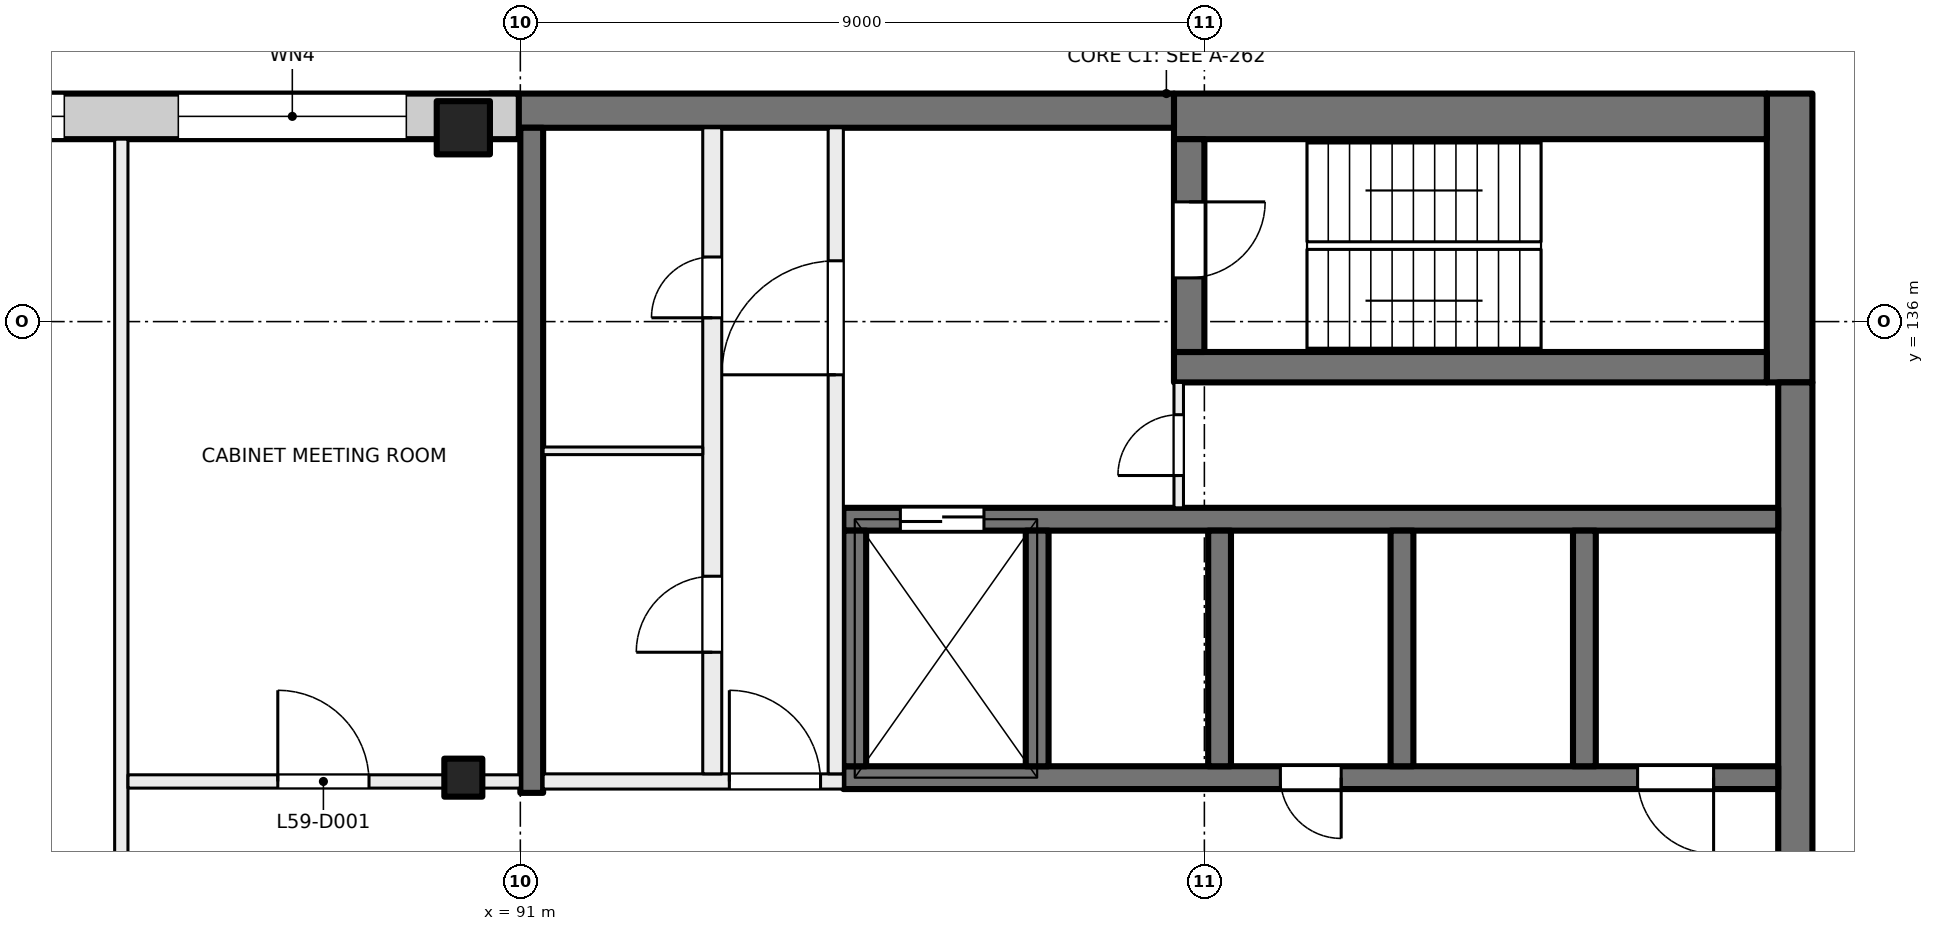
"""IFC4 building model, lengths in metres.
Left out: names, types, materials, properties, quantities, classifications, styles, units other than length and angle.
Written with IfcOpenShell. Run it as: python <this file> out.ifc"""

import sys

from ifc_helpers import new_model, si_unit, direction, frame, frame_2d, origin, origin_2d, place, context, subcontext, project, spatial, rectangle, extrude, element, fill, save


model = new_model("IFC4")
c1 = context("Model", 3, precision=1e-05, world=origin(), true_north=direction((0.0, 1.0)))
c2 = subcontext(c1, "Body", "Model", "MODEL_VIEW")
j1 = project(units=[si_unit("LENGTHUNIT", "METRE"), si_unit("PLANEANGLEUNIT", "RADIAN")], contexts=[c1])
p1 = place(None, origin())
s1 = spatial("IfcSite", under=j1, at=p1, CompositionType="ELEMENT")
p2 = place(p1, origin())
s2 = spatial("IfcBuilding", under=s1, at=p2, CompositionType="ELEMENT")
p3 = place(p2, frame((0.0, 0.0, 249.5)))
s3 = spatial("IfcBuildingStorey", under=s2, at=p3, CompositionType="ELEMENT", Elevation=249.5)
p4 = place(p3, frame((90.25, 130.0, 0.0), z_axis=(0.0, 0.0, 1.0), x_axis=(1.0, 0.0, 0.0)))
e1 = element("IfcColumn", 1, at=p4, inside=s3, PredefinedType="COLUMN", context=c2, shape_type="SweptSolid", body=[
    extrude(rectangle(XDim=0.5, YDim=0.5, at=origin_2d()), origin(), (0.0, 0.0, 1.0), 4.0),
])
p5 = place(p3, frame((90.25, 138.55, 0.0), z_axis=(0.0, 0.0, 1.0), x_axis=(1.0, 0.0, 0.0)))
e2 = element("IfcColumn", 2, at=p5, inside=s3, PredefinedType="COLUMN", context=c2, shape_type="SweptSolid", body=[
    extrude(rectangle(XDim=0.7, YDim=0.7, at=origin_2d()), origin(), (0.0, 0.0, 1.0), 4.0),
])
p6 = place(p3, frame((107.7, 139.0, 0.0), z_axis=(0.0, 0.0, 1.0), x_axis=(0.0, -1.0, 0.0)))
e3 = element("IfcWall", 3, at=p6, inside=s3, PredefinedType="SHEAR", context=c2, shape_type="SweptSolid", body=[
    extrude(rectangle(XDim=3.8, YDim=0.6, at=frame_2d((1.9, 0.0))), origin(), (0.0, 0.0, 1.0), 4.0),
])
p7 = place(p3, frame((107.775, 135.2, 0.0), z_axis=(0.0, 0.0, 1.0), x_axis=(0.0, -1.0, 0.0)))
e4 = element("IfcWall", 4, at=p7, inside=s3, PredefinedType="SHEAR", context=c2, shape_type="SweptSolid", body=[
    extrude(rectangle(XDim=14.4, YDim=0.45, at=frame_2d((7.2, 0.0))), origin(), (0.0, 0.0, 1.0), 4.0),
])
p8 = place(p3, frame((107.4, 138.7, 0.0), z_axis=(0.0, 0.0, 1.0), x_axis=(-1.0, 0.0, 0.0)))
e5 = element("IfcWall", 5, at=p8, inside=s3, PredefinedType="SHEAR", context=c2, shape_type="SweptSolid", body=[
    extrude(rectangle(XDim=7.8, YDim=0.6, at=frame_2d((3.9, 0.0))), origin(), (0.0, 0.0, 1.0), 4.0),
])
p9 = place(p3, frame((99.6, 138.775, 0.0), z_axis=(0.0, 0.0, 1.0), x_axis=(-1.0, 0.0, 0.0)))
e6 = element("IfcWall", 6, at=p9, inside=s3, PredefinedType="SHEAR", context=c2, shape_type="SweptSolid", body=[
    extrude(rectangle(XDim=9.0, YDim=0.45, at=frame_2d((4.5, 0.0))), origin(), (0.0, 0.0, 1.0), 4.0),
])
p10 = place(p3, frame((107.4, 135.4, 0.0), z_axis=(0.0, 0.0, 1.0), x_axis=(-1.0, 0.0, 0.0)))
e7 = element("IfcWall", 7, at=p10, inside=s3, PredefinedType="SHEAR", context=c2, shape_type="SweptSolid", body=[
    extrude(rectangle(XDim=7.8, YDim=0.4, at=frame_2d((3.9, 0.0))), origin(), (0.0, 0.0, 1.0), 4.0),
])
p11 = place(p3, frame((99.8, 138.4, 0.0), z_axis=(0.0, 0.0, 1.0), x_axis=(0.0, -1.0, 0.0)))
e8 = element("IfcWall", 8, at=p11, inside=s3, PredefinedType="SHEAR", context=c2, shape_type="SweptSolid", body=[
    extrude(rectangle(XDim=2.8, YDim=0.4, at=frame_2d((1.4, 0.0))), origin(), (0.0, 0.0, 1.0), 4.0),
])
p12 = place(p11, frame((0.825, 0.0, 0.0)))
e9 = element("IfcOpeningElement", 9, at=p12, cuts=e8, PredefinedType="OPENING", context=c2, shape_type="SweptSolid", body=[
    extrude(rectangle(XDim=1.0, YDim=2.1, at=frame_2d((0.5, 1.05))), frame((0.0, 0.21, 0.0), z_axis=(0.0, -1.0, 0.0), x_axis=(1.0, 0.0, 0.0)), (0.0, 0.0, 1.0), 0.42),
])
p13 = place(p3, frame((107.55, 130.0, 0.0), z_axis=(0.0, 0.0, 1.0), x_axis=(-1.0, 0.0, 0.0)))
e10 = element("IfcWall", 10, at=p13, inside=s3, PredefinedType="SHEAR", context=c2, shape_type="SweptSolid", body=[
    extrude(rectangle(XDim=12.3, YDim=0.3, at=frame_2d((6.15, 0.0))), origin(), (0.0, 0.0, 1.0), 4.0),
])
p14 = place(p13, frame((0.85, 0.0, 0.0)))
e11 = element("IfcOpeningElement", 11, at=p14, cuts=e10, PredefinedType="OPENING", context=c2, shape_type="SweptSolid", body=[
    extrude(rectangle(XDim=1.0, YDim=2.1, at=frame_2d((0.5, 1.05))), frame((0.0, 0.16, 0.0), z_axis=(0.0, -1.0, 0.0), x_axis=(1.0, 0.0, 0.0)), (0.0, 0.0, 1.0), 0.32),
])
p15 = place(p13, frame((5.75, 0.0, 0.0)))
e12 = element("IfcOpeningElement", 12, at=p15, cuts=e10, PredefinedType="OPENING", context=c2, shape_type="SweptSolid", body=[
    extrude(rectangle(XDim=0.8, YDim=2.1, at=frame_2d((0.4, 1.05))), frame((0.0, 0.16, 0.0), z_axis=(0.0, -1.0, 0.0), x_axis=(1.0, 0.0, 0.0)), (0.0, 0.0, 1.0), 0.32),
])
p16 = place(p3, frame((107.55, 133.4, 0.0), z_axis=(0.0, 0.0, 1.0), x_axis=(-1.0, 0.0, 0.0)))
e13 = element("IfcWall", 13, at=p16, inside=s3, PredefinedType="SHEAR", context=c2, shape_type="SweptSolid", body=[
    extrude(rectangle(XDim=12.3, YDim=0.3, at=frame_2d((6.15, 0.0))), origin(), (0.0, 0.0, 1.0), 4.0),
])
p17 = place(p16, frame((10.45, 0.0, 0.0)))
e14 = element("IfcOpeningElement", 14, at=p17, cuts=e13, PredefinedType="OPENING", context=c2, shape_type="SweptSolid", body=[
    extrude(rectangle(XDim=1.1, YDim=2.1, at=frame_2d((0.55, 1.05))), frame((0.0, 0.16, 0.0), z_axis=(0.0, -1.0, 0.0), x_axis=(1.0, 0.0, 0.0)), (0.0, 0.0, 1.0), 0.32),
])
for number, where, z_axis, x_axis in (
    (15, (105.0, 133.25, 0.0), (0.0, 0.0, 1.0), (0.0, -1.0, 0.0)),
    (16, (102.6, 133.25, 0.0), (0.0, 0.0, 1.0), (0.0, -1.0, 0.0)),
    (17, (100.2, 133.25, 0.0), (0.0, 0.0, 1.0), (0.0, -1.0, 0.0)),
    (18, (97.8, 133.25, 0.0), (0.0, 0.0, 1.0), (0.0, -1.0, 0.0)),
    (19, (95.4, 133.25, 0.0), (0.0, 0.0, 1.0), (0.0, -1.0, 0.0)),
):
    element("IfcWall", number, at=place(p3, frame(where, z_axis=z_axis, x_axis=x_axis)), inside=s3, PredefinedType="SHEAR", context=c2, shape_type="SweptSolid", body=[
        extrude(rectangle(XDim=3.1, YDim=0.3, at=frame_2d((1.55, 0.0))), origin(), (0.0, 0.0, 1.0), 4.0),
    ])
p18 = place(p3, frame((91.15, 138.55, 0.0), z_axis=(0.0, 0.0, 1.0), x_axis=(0.0, -1.0, 0.0)))
e20 = element("IfcWall", 20, at=p18, inside=s3, PredefinedType="SHEAR", context=c2, shape_type="SweptSolid", body=[
    extrude(rectangle(XDim=8.75, YDim=0.3, at=frame_2d((4.375, 0.0))), origin(), (0.0, 0.0, 1.0), 4.0),
])
p19 = place(p3, frame((47.07, 138.7, 0.0), z_axis=(0.0, 0.0, 1.0), x_axis=(1.0, 0.0, 0.0)))
e21 = element("IfcWall", 21, at=p19, inside=s3, PredefinedType="SOLIDWALL", context=c2, shape_type="SweptSolid", body=[
    extrude(rectangle(XDim=43.91, YDim=0.6, at=frame_2d((21.955, 0.0))), origin(), (0.0, 0.0, 1.0), 3.625),
])
p20 = place(p19, frame((3.43, 0.0, 0.9)))
e22 = element("IfcOpeningElement", 22, at=p20, cuts=e21, PredefinedType="OPENING", context=c2, shape_type="SweptSolid", body=[
    extrude(rectangle(XDim=3.0, YDim=2.4, at=frame_2d((1.5, 1.2))), frame((0.0, 0.31, 0.0), z_axis=(0.0, -1.0, 0.0), x_axis=(1.0, 0.0, 0.0)), (0.0, 0.0, 1.0), 0.62),
])
p21 = place(p19, frame((7.93, 0.0, 0.9)))
e23 = element("IfcOpeningElement", 23, at=p21, cuts=e21, PredefinedType="OPENING", context=c2, shape_type="SweptSolid", body=[
    extrude(rectangle(XDim=3.0, YDim=2.4, at=frame_2d((1.5, 1.2))), frame((0.0, 0.31, 0.0), z_axis=(0.0, -1.0, 0.0), x_axis=(1.0, 0.0, 0.0)), (0.0, 0.0, 1.0), 0.62),
])
p22 = place(p19, frame((12.43, 0.0, 0.9)))
e24 = element("IfcOpeningElement", 24, at=p22, cuts=e21, PredefinedType="OPENING", context=c2, shape_type="SweptSolid", body=[
    extrude(rectangle(XDim=3.0, YDim=2.4, at=frame_2d((1.5, 1.2))), frame((0.0, 0.31, 0.0), z_axis=(0.0, -1.0, 0.0), x_axis=(1.0, 0.0, 0.0)), (0.0, 0.0, 1.0), 0.62),
])
p23 = place(p19, frame((16.93, 0.0, 0.9)))
e25 = element("IfcOpeningElement", 25, at=p23, cuts=e21, PredefinedType="OPENING", context=c2, shape_type="SweptSolid", body=[
    extrude(rectangle(XDim=3.0, YDim=2.4, at=frame_2d((1.5, 1.2))), frame((0.0, 0.31, 0.0), z_axis=(0.0, -1.0, 0.0), x_axis=(1.0, 0.0, 0.0)), (0.0, 0.0, 1.0), 0.62),
])
p24 = place(p19, frame((21.43, 0.0, 0.9)))
e26 = element("IfcOpeningElement", 26, at=p24, cuts=e21, PredefinedType="OPENING", context=c2, shape_type="SweptSolid", body=[
    extrude(rectangle(XDim=3.0, YDim=2.4, at=frame_2d((1.5, 1.2))), frame((0.0, 0.31, 0.0), z_axis=(0.0, -1.0, 0.0), x_axis=(1.0, 0.0, 0.0)), (0.0, 0.0, 1.0), 0.62),
])
p25 = place(p19, frame((25.93, 0.0, 0.9)))
e27 = element("IfcOpeningElement", 27, at=p25, cuts=e21, PredefinedType="OPENING", context=c2, shape_type="SweptSolid", body=[
    extrude(rectangle(XDim=3.0, YDim=2.4, at=frame_2d((1.5, 1.2))), frame((0.0, 0.31, 0.0), z_axis=(0.0, -1.0, 0.0), x_axis=(1.0, 0.0, 0.0)), (0.0, 0.0, 1.0), 0.62),
])
p26 = place(p19, frame((30.43, 0.0, 0.9)))
e28 = element("IfcOpeningElement", 28, at=p26, cuts=e21, PredefinedType="OPENING", context=c2, shape_type="SweptSolid", body=[
    extrude(rectangle(XDim=3.0, YDim=2.4, at=frame_2d((1.5, 1.2))), frame((0.0, 0.31, 0.0), z_axis=(0.0, -1.0, 0.0), x_axis=(1.0, 0.0, 0.0)), (0.0, 0.0, 1.0), 0.62),
])
p27 = place(p19, frame((34.93, 0.0, 0.9)))
e29 = element("IfcOpeningElement", 29, at=p27, cuts=e21, PredefinedType="OPENING", context=c2, shape_type="SweptSolid", body=[
    extrude(rectangle(XDim=3.0, YDim=2.4, at=frame_2d((1.5, 1.2))), frame((0.0, 0.31, 0.0), z_axis=(0.0, -1.0, 0.0), x_axis=(1.0, 0.0, 0.0)), (0.0, 0.0, 1.0), 0.62),
])
p28 = place(p19, frame((39.43, 0.0, 0.9)))
e30 = element("IfcOpeningElement", 30, at=p28, cuts=e21, PredefinedType="OPENING", context=c2, shape_type="SweptSolid", body=[
    extrude(rectangle(XDim=3.0, YDim=2.4, at=frame_2d((1.5, 1.2))), frame((0.0, 0.31, 0.0), z_axis=(0.0, -1.0, 0.0), x_axis=(1.0, 0.0, 0.0)), (0.0, 0.0, 1.0), 0.62),
])
p29 = place(p3, frame((91.3, 129.95, 0.0), z_axis=(0.0, 0.0, 1.0), x_axis=(1.0, 0.0, 0.0)))
e31 = element("IfcWall", 31, at=p29, inside=s3, PredefinedType="PARTITIONING", context=c2, shape_type="SweptSolid", body=[
    extrude(rectangle(XDim=3.95, YDim=0.2, at=frame_2d((1.975, 0.0))), origin(), (0.0, 0.0, 1.0), 3.625),
])
p30 = place(p29, frame((2.45, 0.0, 0.0)))
e32 = element("IfcOpeningElement", 32, at=p30, cuts=e31, PredefinedType="OPENING", context=c2, shape_type="SweptSolid", body=[
    extrude(rectangle(XDim=1.2, YDim=2.1, at=frame_2d((0.6, 1.05))), frame((0.0, 0.11, 0.0), z_axis=(0.0, -1.0, 0.0), x_axis=(1.0, 0.0, 0.0)), (0.0, 0.0, 1.0), 0.22),
])
p31 = place(p3, frame((95.15, 130.05, 0.0), z_axis=(0.0, 0.0, 1.0), x_axis=(0.0, 1.0, 0.0)))
e33 = element("IfcWall", 33, at=p31, inside=s3, PredefinedType="PARTITIONING", context=c2, shape_type="SweptSolid", body=[
    extrude(rectangle(XDim=8.5, YDim=0.2, at=frame_2d((4.25, 0.0))), origin(), (0.0, 0.0, 1.0), 3.625),
])
p32 = place(p31, frame((5.25, 0.0, 0.0)))
e34 = element("IfcOpeningElement", 34, at=p32, cuts=e33, PredefinedType="OPENING", context=c2, shape_type="SweptSolid", body=[
    extrude(rectangle(XDim=1.5, YDim=2.1, at=frame_2d((0.75, 1.05))), frame((0.0, 0.11, 0.0), z_axis=(0.0, -1.0, 0.0), x_axis=(1.0, 0.0, 0.0)), (0.0, 0.0, 1.0), 0.22),
])
p33 = place(p3, frame((93.525, 130.05, 0.0), z_axis=(0.0, 0.0, 1.0), x_axis=(0.0, 1.0, 0.0)))
e35 = element("IfcWall", 35, at=p33, inside=s3, PredefinedType="PARTITIONING", context=c2, shape_type="SweptSolid", body=[
    extrude(rectangle(XDim=8.5, YDim=0.25, at=frame_2d((4.25, 0.0))), origin(), (0.0, 0.0, 1.0), 3.625),
])
p34 = place(p33, frame((1.6, 0.0, 0.0)))
e36 = element("IfcOpeningElement", 36, at=p34, cuts=e35, PredefinedType="OPENING", context=c2, shape_type="SweptSolid", body=[
    extrude(rectangle(XDim=1.0, YDim=2.1, at=frame_2d((0.5, 1.05))), frame((0.0, 0.135, 0.0), z_axis=(0.0, -1.0, 0.0), x_axis=(1.0, 0.0, 0.0)), (0.0, 0.0, 1.0), 0.27),
])
p35 = place(p33, frame((6.0, 0.0, 0.0)))
e37 = element("IfcOpeningElement", 37, at=p35, cuts=e35, PredefinedType="OPENING", context=c2, shape_type="SweptSolid", body=[
    extrude(rectangle(XDim=0.8, YDim=2.1, at=frame_2d((0.4, 1.05))), frame((0.0, 0.135, 0.0), z_axis=(0.0, -1.0, 0.0), x_axis=(1.0, 0.0, 0.0)), (0.0, 0.0, 1.0), 0.27),
])
p36 = place(p3, frame((99.663, 133.55, 0.0), z_axis=(0.0, 0.0, 1.0), x_axis=(0.0, 1.0, 0.0)))
e38 = element("IfcWall", 38, at=p36, inside=s3, PredefinedType="PARTITIONING", context=c2, shape_type="SweptSolid", body=[
    extrude(rectangle(XDim=1.65, YDim=0.125, at=frame_2d((0.825, 0.0))), origin(), (0.0, 0.0, 1.0), 3.625),
])
p37 = place(p36, frame((0.425, 0.0, 0.0)))
e39 = element("IfcOpeningElement", 39, at=p37, cuts=e38, PredefinedType="OPENING", context=c2, shape_type="SweptSolid", body=[
    extrude(rectangle(XDim=0.8, YDim=2.1, at=frame_2d((0.4, 1.05))), frame((0.0, 0.073, 0.0), z_axis=(0.0, -1.0, 0.0), x_axis=(1.0, 0.0, 0.0)), (0.0, 0.0, 1.0), 0.145),
])
p38 = place(p3, frame((91.3, 134.3, 0.0), z_axis=(0.0, 0.0, 1.0), x_axis=(1.0, 0.0, 0.0)))
e40 = element("IfcWall", 40, at=p38, inside=s3, PredefinedType="PARTITIONING", context=c2, shape_type="SweptSolid", body=[
    extrude(rectangle(XDim=2.1, YDim=0.1, at=frame_2d((1.05, 0.0))), origin(), (0.0, 0.0, 1.0), 3.625),
])
p39 = place(p3, frame((85.75, 125.912, 0.0), z_axis=(0.0, 0.0, 1.0), x_axis=(0.0, 1.0, 0.0)))
e41 = element("IfcWall", 41, at=p39, inside=s3, PredefinedType="PARTITIONING", context=c2, shape_type="SweptSolid", body=[
    extrude(rectangle(XDim=12.488, YDim=0.175, at=frame_2d((6.244, 0.0))), origin(), (0.0, 0.0, 1.0), 3.625),
])
p40 = place(p3, frame((85.838, 129.95, 0.0), z_axis=(0.0, 0.0, 1.0), x_axis=(1.0, 0.0, 0.0)))
e42 = element("IfcWall", 42, at=p40, inside=s3, PredefinedType="PARTITIONING", context=c2, shape_type="SweptSolid", body=[
    extrude(rectangle(XDim=5.162, YDim=0.175, at=frame_2d((2.581, 0.0))), origin(), (0.0, 0.0, 1.0), 3.625),
])
p41 = place(p40, frame((1.971, 0.0, 0.0)))
e43 = element("IfcOpeningElement", 43, at=p41, cuts=e42, PredefinedType="OPENING", context=c2, shape_type="SweptSolid", body=[
    extrude(rectangle(XDim=1.2, YDim=2.1, at=frame_2d((0.6, 1.05))), frame((0.0, 0.097, 0.0), z_axis=(0.0, -1.0, 0.0), x_axis=(1.0, 0.0, 0.0)), (0.0, 0.0, 1.0), 0.195),
])
p42 = place(p27, origin())
e44 = element("IfcWindow", 44, at=p42, inside=s3, PartitioningType="SINGLE_PANEL", PredefinedType="WINDOW", context=c2, shape_type="SweptSolid", body=[
    extrude(rectangle(XDim=3.0, YDim=2.4, at=frame_2d((1.5, 1.2))), frame((0.0, 0.03, 0.0), z_axis=(0.0, -1.0, 0.0), x_axis=(1.0, 0.0, 0.0)), (0.0, 0.0, 1.0), 0.06),
])
fill(e29, e44)
p43 = place(p28, origin())
e45 = element("IfcWindow", 45, at=p43, inside=s3, PartitioningType="SINGLE_PANEL", PredefinedType="WINDOW", context=c2, shape_type="SweptSolid", body=[
    extrude(rectangle(XDim=3.0, YDim=2.4, at=frame_2d((1.5, 1.2))), frame((0.0, 0.03, 0.0), z_axis=(0.0, -1.0, 0.0), x_axis=(1.0, 0.0, 0.0)), (0.0, 0.0, 1.0), 0.06),
])
fill(e30, e45)
p44 = place(p14, origin())
e46 = element("IfcDoor", 46, at=p44, inside=s3, OperationType="SINGLE_SWING_LEFT", PredefinedType="DOOR", context=c2, shape_type="SweptSolid", body=[
    extrude(rectangle(XDim=1.0, YDim=2.1, at=frame_2d((0.5, 1.05))), frame((0.0, 0.025, 0.0), z_axis=(0.0, -1.0, 0.0), x_axis=(1.0, 0.0, 0.0)), (0.0, 0.0, 1.0), 0.05),
])
fill(e11, e46)
p45 = place(p15, origin())
e47 = element("IfcDoor", 47, at=p45, inside=s3, OperationType="SINGLE_SWING_RIGHT", PredefinedType="DOOR", context=c2, shape_type="SweptSolid", body=[
    extrude(rectangle(XDim=0.8, YDim=2.1, at=frame_2d((0.4, 1.05))), frame((0.0, 0.025, 0.0), z_axis=(0.0, -1.0, 0.0), x_axis=(1.0, 0.0, 0.0)), (0.0, 0.0, 1.0), 0.05),
])
fill(e12, e47)
p46 = place(p30, origin())
e48 = element("IfcDoor", 48, at=p46, inside=s3, OperationType="DOUBLE_DOOR_SINGLE_SWING", PredefinedType="DOOR", context=c2, shape_type="SweptSolid", body=[
    extrude(rectangle(XDim=1.2, YDim=2.1, at=frame_2d((0.6, 1.05))), frame((0.0, 0.025, 0.0), z_axis=(0.0, -1.0, 0.0), x_axis=(1.0, 0.0, 0.0)), (0.0, 0.0, 1.0), 0.05),
])
fill(e32, e48)
p47 = place(p32, origin())
e49 = element("IfcDoor", 49, at=p47, inside=s3, OperationType="DOUBLE_DOOR_SINGLE_SWING", PredefinedType="DOOR", context=c2, shape_type="SweptSolid", body=[
    extrude(rectangle(XDim=1.5, YDim=2.1, at=frame_2d((0.75, 1.05))), frame((0.0, 0.025, 0.0), z_axis=(0.0, -1.0, 0.0), x_axis=(1.0, 0.0, 0.0)), (0.0, 0.0, 1.0), 0.05),
])
fill(e34, e49)
p48 = place(p12, origin())
e50 = element("IfcDoor", 50, at=p48, inside=s3, OperationType="SINGLE_SWING_RIGHT", PredefinedType="DOOR", context=c2, shape_type="SweptSolid", body=[
    extrude(rectangle(XDim=1.0, YDim=2.1, at=frame_2d((0.5, 1.05))), frame((0.0, 0.025, 0.0), z_axis=(0.0, -1.0, 0.0), x_axis=(1.0, 0.0, 0.0)), (0.0, 0.0, 1.0), 0.05),
])
fill(e9, e50)
p49 = place(p37, origin())
e51 = element("IfcDoor", 51, at=p49, inside=s3, OperationType="SINGLE_SWING_LEFT", PredefinedType="DOOR", context=c2, shape_type="SweptSolid", body=[
    extrude(rectangle(XDim=0.8, YDim=2.1, at=frame_2d((0.4, 1.05))), frame((0.0, 0.025, 0.0), z_axis=(0.0, -1.0, 0.0), x_axis=(1.0, 0.0, 0.0)), (0.0, 0.0, 1.0), 0.05),
])
fill(e39, e51)
p50 = place(p34, origin())
e52 = element("IfcDoor", 52, at=p50, inside=s3, OperationType="SINGLE_SWING_RIGHT", PredefinedType="DOOR", context=c2, shape_type="SweptSolid", body=[
    extrude(rectangle(XDim=1.0, YDim=2.1, at=frame_2d((0.5, 1.05))), frame((0.0, 0.025, 0.0), z_axis=(0.0, -1.0, 0.0), x_axis=(1.0, 0.0, 0.0)), (0.0, 0.0, 1.0), 0.05),
])
fill(e36, e52)
p51 = place(p35, origin())
e53 = element("IfcDoor", 53, at=p51, inside=s3, OperationType="SINGLE_SWING_LEFT", PredefinedType="DOOR", context=c2, shape_type="SweptSolid", body=[
    extrude(rectangle(XDim=0.8, YDim=2.1, at=frame_2d((0.4, 1.05))), frame((0.0, 0.025, 0.0), z_axis=(0.0, -1.0, 0.0), x_axis=(1.0, 0.0, 0.0)), (0.0, 0.0, 1.0), 0.05),
])
fill(e37, e53)
p52 = place(p17, origin())
e54 = element("IfcDoor", 54, at=p52, inside=s3, OperationType="DOUBLE_DOOR_SLIDING", PredefinedType="DOOR", context=c2, shape_type="SweptSolid", body=[
    extrude(rectangle(XDim=1.1, YDim=2.1, at=frame_2d((0.55, 1.05))), frame((0.0, 0.025, 0.0), z_axis=(0.0, -1.0, 0.0), x_axis=(1.0, 0.0, 0.0)), (0.0, 0.0, 1.0), 0.05),
])
fill(e14, e54)
p53 = place(p41, origin())
e55 = element("IfcDoor", 55, at=p53, inside=s3, OperationType="DOUBLE_DOOR_SINGLE_SWING", PredefinedType="DOOR", context=c2, shape_type="SweptSolid", body=[
    extrude(rectangle(XDim=1.2, YDim=2.1, at=frame_2d((0.6, 1.05))), frame((0.0, 0.025, 0.0), z_axis=(0.0, -1.0, 0.0), x_axis=(1.0, 0.0, 0.0)), (0.0, 0.0, 1.0), 0.05),
])
fill(e43, e55)
save(model, sys.argv[1])
